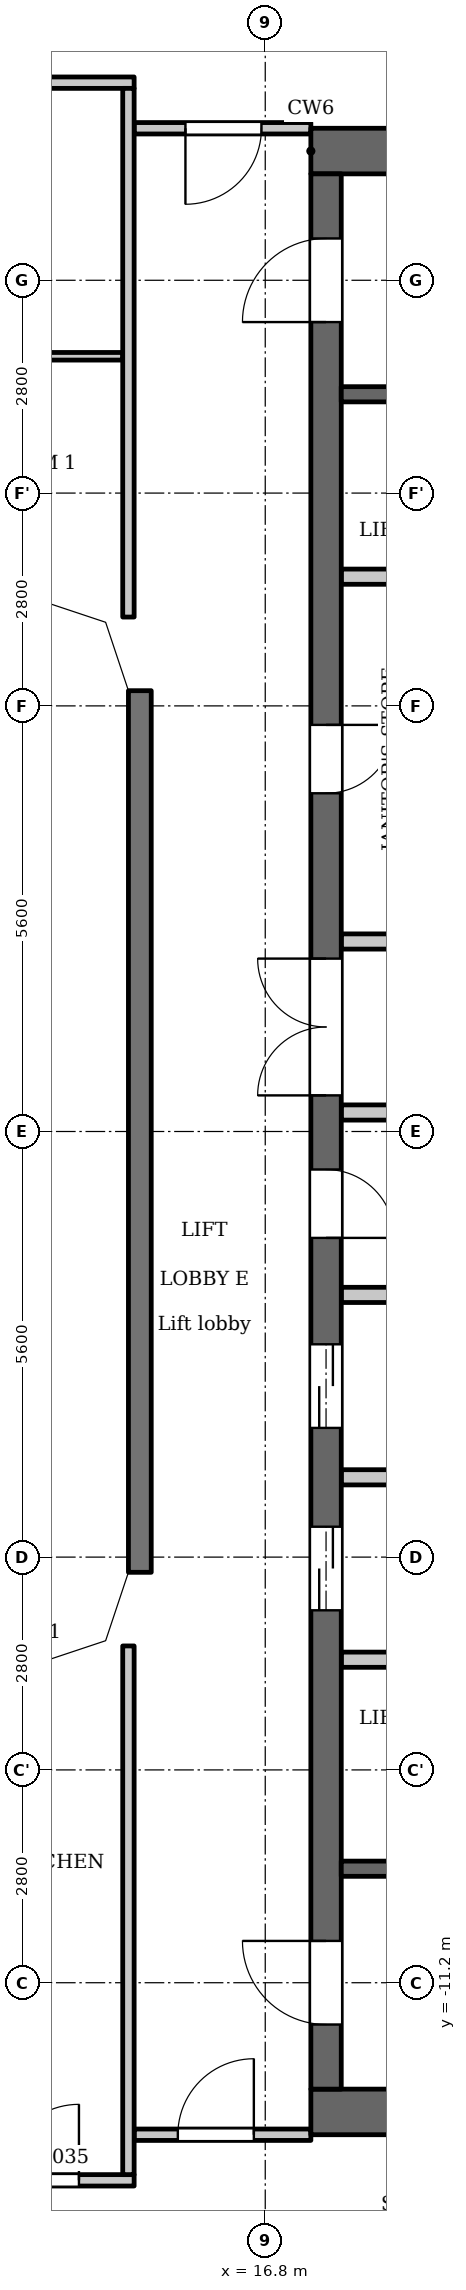
"""IFC4 building model, lengths in metres.
Left out: names, types, materials, properties, quantities, classifications, styles, units other than length and angle.
Written with IfcOpenShell. Run it as: python <this file> out.ifc"""

import sys

from ifc_helpers import new_model, si_unit, direction, frame, frame_2d, origin, place, context, subcontext, project, spatial, polyline, rectangle, outline, extrude, element, fill, save


model = new_model("IFC4")
c1 = context("Model", 3, precision=1e-05, world=origin(), true_north=direction((0.0, 1.0)))
c2 = subcontext(c1, "Body", "Model", "MODEL_VIEW")
j1 = project(units=[si_unit("LENGTHUNIT", "METRE"), si_unit("PLANEANGLEUNIT", "RADIAN")], contexts=[c1])
p1 = place(None, origin())
s1 = spatial("IfcSite", under=j1, at=p1, CompositionType="ELEMENT")
p2 = place(p1, origin())
s2 = spatial("IfcBuilding", under=s1, at=p2, CompositionType="ELEMENT")
p3 = place(p2, frame((0.0, 0.0, 276.7)))
s3 = spatial("IfcBuildingStorey", under=s2, at=p3, CompositionType="ELEMENT", Elevation=276.7)
p4 = place(p3, frame((15.15, 5.8, 0.0), z_axis=(0.0, 0.0, 1.0), x_axis=(0.0, -1.0, 0.0)))
e1 = element("IfcWall", 1, at=p4, inside=s3, PredefinedType="SOLIDWALL", context=c2, shape_type="SweptSolid", body=[
    extrude(rectangle(XDim=11.6, YDim=0.3, at=frame_2d((5.8, 0.0))), origin(), (0.0, 0.0, 1.0), 3.2),
])
for number, where, z_axis, x_axis in (
    (2, (17.4, 12.9, 0.0), (0.0, 0.0, 1.0), (1.0, 0.0, 0.0)),
    (3, (17.4, -12.9, 0.0), (0.0, 0.0, 1.0), (1.0, 0.0, 0.0)),
):
    element("IfcWall", number, at=place(p3, frame(where, z_axis=z_axis, x_axis=x_axis)), inside=s3, PredefinedType="SHEAR", context=c2, shape_type="SweptSolid", body=[
        extrude(rectangle(XDim=7.32, YDim=0.6, at=frame_2d((3.66, 0.0))), origin(), (0.0, 0.0, 1.0), 3.2),
    ])
p5 = place(p3, frame((17.6, -12.6, 0.0), z_axis=(0.0, 0.0, 1.0), x_axis=(0.0, 1.0, 0.0)))
e4 = element("IfcWall", 4, at=p5, inside=s3, PredefinedType="SHEAR", context=c2, shape_type="SweptSolid", body=[
    extrude(rectangle(XDim=25.2, YDim=0.4, at=frame_2d((12.6, 0.0))), origin(), (0.0, 0.0, 1.0), 3.2),
])
p6 = place(p5, frame((6.3, 0.0, 0.0)))
e5 = element("IfcOpeningElement", 5, at=p6, cuts=e4, PredefinedType="OPENING", context=c2, shape_type="SweptSolid", body=[
    extrude(rectangle(XDim=1.1, YDim=2.1, at=frame_2d((0.55, 1.05))), frame((0.0, 0.21, 0.0), z_axis=(0.0, -1.0, 0.0), x_axis=(1.0, 0.0, 0.0)), (0.0, 0.0, 1.0), 0.42),
])
p7 = place(p5, frame((8.7, 0.0, 0.0)))
e6 = element("IfcOpeningElement", 6, at=p7, cuts=e4, PredefinedType="OPENING", context=c2, shape_type="SweptSolid", body=[
    extrude(rectangle(XDim=1.1, YDim=2.1, at=frame_2d((0.55, 1.05))), frame((0.0, 0.21, 0.0), z_axis=(0.0, -1.0, 0.0), x_axis=(1.0, 0.0, 0.0)), (0.0, 0.0, 1.0), 0.42),
])
p8 = place(p5, frame((11.2, 0.0, 0.0)))
e7 = element("IfcOpeningElement", 7, at=p8, cuts=e4, PredefinedType="OPENING", context=c2, shape_type="SweptSolid", body=[
    extrude(rectangle(XDim=0.9, YDim=2.1, at=frame_2d((0.45, 1.05))), frame((0.0, 0.21, 0.0), z_axis=(0.0, -1.0, 0.0), x_axis=(1.0, 0.0, 0.0)), (0.0, 0.0, 1.0), 0.42),
])
p9 = place(p5, frame((17.05, 0.0, 0.0)))
e8 = element("IfcOpeningElement", 8, at=p9, cuts=e4, PredefinedType="OPENING", context=c2, shape_type="SweptSolid", body=[
    extrude(rectangle(XDim=0.9, YDim=2.1, at=frame_2d((0.45, 1.05))), frame((0.0, 0.21, 0.0), z_axis=(0.0, -1.0, 0.0), x_axis=(1.0, 0.0, 0.0)), (0.0, 0.0, 1.0), 0.42),
])
p10 = place(p5, frame((23.25, 0.0, 0.0)))
e9 = element("IfcOpeningElement", 9, at=p10, cuts=e4, PredefinedType="OPENING", context=c2, shape_type="SweptSolid", body=[
    extrude(rectangle(XDim=1.1, YDim=2.1, at=frame_2d((0.55, 1.05))), frame((0.0, 0.21, 0.0), z_axis=(0.0, -1.0, 0.0), x_axis=(1.0, 0.0, 0.0)), (0.0, 0.0, 1.0), 0.42),
])
p11 = place(p5, frame((0.85, 0.0, 0.0)))
e10 = element("IfcOpeningElement", 10, at=p11, cuts=e4, PredefinedType="OPENING", context=c2, shape_type="SweptSolid", body=[
    extrude(rectangle(XDim=1.1, YDim=2.1, at=frame_2d((0.55, 1.05))), frame((0.0, 0.21, 0.0), z_axis=(0.0, -1.0, 0.0), x_axis=(1.0, 0.0, 0.0)), (0.0, 0.0, 1.0), 0.42),
])
p12 = place(p5, frame((13.075, 0.0, 0.0)))
e11 = element("IfcOpeningElement", 11, at=p12, cuts=e4, PredefinedType="OPENING", context=c2, shape_type="SweptSolid", body=[
    extrude(rectangle(XDim=1.8, YDim=2.1, at=frame_2d((0.9, 1.05))), frame((0.0, 0.21, 0.0), z_axis=(0.0, -1.0, 0.0), x_axis=(1.0, 0.0, 0.0)), (0.0, 0.0, 1.0), 0.42),
])
p13 = place(p3, frame((17.8, -9.7, 0.0), z_axis=(0.0, 0.0, 1.0), x_axis=(1.0, 0.0, 0.0)))
e12 = element("IfcWall", 12, at=p13, inside=s3, PredefinedType="SHEAR", context=c2, shape_type="SweptSolid", body=[
    extrude(rectangle(XDim=5.8, YDim=0.2, at=frame_2d((2.9, 0.0))), origin(), (0.0, 0.0, 1.0), 3.2),
])
p14 = place(p13, frame((0.85, 0.0, 0.0)))
e13 = element("IfcOpeningElement", 13, at=p14, cuts=e12, PredefinedType="OPENING", context=c2, shape_type="SweptSolid", body=[
    extrude(rectangle(XDim=1.1, YDim=2.1, at=frame_2d((0.55, 1.05))), frame((0.0, 0.11, 0.0), z_axis=(0.0, -1.0, 0.0), x_axis=(1.0, 0.0, 0.0)), (0.0, 0.0, 1.0), 0.22),
])
p15 = place(p13, frame((3.75, 0.0, 0.0)))
e14 = element("IfcOpeningElement", 14, at=p15, cuts=e12, PredefinedType="OPENING", context=c2, shape_type="SweptSolid", body=[
    extrude(rectangle(XDim=1.1, YDim=2.1, at=frame_2d((0.55, 1.05))), frame((0.0, 0.11, 0.0), z_axis=(0.0, -1.0, 0.0), x_axis=(1.0, 0.0, 0.0)), (0.0, 0.0, 1.0), 0.22),
])
for number, where, z_axis, x_axis in (
    (15, (17.8, -6.95, 0.0), (0.0, 0.0, 1.0), (1.0, 0.0, 0.0)),
    (16, (17.8, -4.55, 0.0), (0.0, 0.0, 1.0), (1.0, 0.0, 0.0)),
    (17, (17.8, -2.15, 0.0), (0.0, 0.0, 1.0), (1.0, 0.0, 0.0)),
):
    element("IfcWall", number, at=place(p3, frame(where, z_axis=z_axis, x_axis=x_axis)), inside=s3, PredefinedType="PARTITIONING", context=c2, shape_type="SweptSolid", body=[
        extrude(rectangle(XDim=2.8, YDim=0.2, at=frame_2d((1.4, 0.0))), origin(), (0.0, 0.0, 1.0), 3.2),
    ])
p16 = place(p3, frame((17.8, 0.25, 0.0), z_axis=(0.0, 0.0, 1.0), x_axis=(1.0, 0.0, 0.0)))
e18 = element("IfcWall", 18, at=p16, inside=s3, PredefinedType="PARTITIONING", context=c2, shape_type="SweptSolid", body=[
    extrude(rectangle(XDim=3.0, YDim=0.2, at=frame_2d((1.5, 0.0))), origin(), (0.0, 0.0, 1.0), 3.2),
])
p17 = place(p3, frame((17.8, 2.5, 0.0), z_axis=(0.0, 0.0, 1.0), x_axis=(1.0, 0.0, 0.0)))
e19 = element("IfcWall", 19, at=p17, inside=s3, PredefinedType="PARTITIONING", context=c2, shape_type="SweptSolid", body=[
    extrude(rectangle(XDim=3.0, YDim=0.2, at=frame_2d((1.5, 0.0))), origin(), (0.0, 0.0, 1.0), 3.2),
])
p18 = place(p17, frame((1.7, 0.0, 0.0)))
e20 = element("IfcOpeningElement", 20, at=p18, cuts=e19, PredefinedType="OPENING", context=c2, shape_type="SweptSolid", body=[
    extrude(rectangle(XDim=0.9, YDim=2.1, at=frame_2d((0.45, 1.05))), frame((0.0, 0.11, 0.0), z_axis=(0.0, -1.0, 0.0), x_axis=(1.0, 0.0, 0.0)), (0.0, 0.0, 1.0), 0.22),
])
p19 = place(p3, frame((17.8, 7.3, 0.0), z_axis=(0.0, 0.0, 1.0), x_axis=(1.0, 0.0, 0.0)))
e21 = element("IfcWall", 21, at=p19, inside=s3, PredefinedType="PARTITIONING", context=c2, shape_type="SweptSolid", body=[
    extrude(rectangle(XDim=2.8, YDim=0.2, at=frame_2d((1.4, 0.0))), origin(), (0.0, 0.0, 1.0), 3.2),
])
p20 = place(p3, frame((17.8, 9.7, 0.0), z_axis=(0.0, 0.0, 1.0), x_axis=(1.0, 0.0, 0.0)))
e22 = element("IfcWall", 22, at=p20, inside=s3, PredefinedType="SHEAR", context=c2, shape_type="SweptSolid", body=[
    extrude(rectangle(XDim=5.8, YDim=0.2, at=frame_2d((2.9, 0.0))), origin(), (0.0, 0.0, 1.0), 3.2),
])
p21 = place(p20, frame((0.85, 0.0, 0.0)))
e23 = element("IfcOpeningElement", 23, at=p21, cuts=e22, PredefinedType="OPENING", context=c2, shape_type="SweptSolid", body=[
    extrude(rectangle(XDim=1.1, YDim=2.1, at=frame_2d((0.55, 1.05))), frame((0.0, 0.11, 0.0), z_axis=(0.0, -1.0, 0.0), x_axis=(1.0, 0.0, 0.0)), (0.0, 0.0, 1.0), 0.22),
])
p22 = place(p20, frame((3.75, 0.0, 0.0)))
e24 = element("IfcOpeningElement", 24, at=p22, cuts=e22, PredefinedType="OPENING", context=c2, shape_type="SweptSolid", body=[
    extrude(rectangle(XDim=1.1, YDim=2.1, at=frame_2d((0.55, 1.05))), frame((0.0, 0.11, 0.0), z_axis=(0.0, -1.0, 0.0), x_axis=(1.0, 0.0, 0.0)), (0.0, 0.0, 1.0), 0.22),
])
p23 = place(p3, frame((-15.075, -13.8, 0.0), z_axis=(0.0, 0.0, 1.0), x_axis=(1.0, 0.0, 0.0)))
e25 = element("IfcWall", 25, at=p23, inside=s3, PredefinedType="PARTITIONING", context=c2, shape_type="SweptSolid", body=[
    extrude(rectangle(XDim=30.15, YDim=0.15, at=frame_2d((15.075, 0.0))), origin(), (0.0, 0.0, 1.0), 3.2),
])
p24 = place(p23, frame((0.725, 0.0, 0.0)))
e26 = element("IfcOpeningElement", 26, at=p24, cuts=e25, PredefinedType="OPENING", context=c2, shape_type="SweptSolid", body=[
    extrude(rectangle(XDim=1.0, YDim=2.1, at=frame_2d((0.5, 1.05))), frame((0.0, 0.085, 0.0), z_axis=(0.0, -1.0, 0.0), x_axis=(1.0, 0.0, 0.0)), (0.0, 0.0, 1.0), 0.17),
])
p25 = place(p23, frame((7.825, 0.0, 0.0)))
e27 = element("IfcOpeningElement", 27, at=p25, cuts=e25, PredefinedType="OPENING", context=c2, shape_type="SweptSolid", body=[
    extrude(rectangle(XDim=1.0, YDim=2.1, at=frame_2d((0.5, 1.05))), frame((0.0, 0.085, 0.0), z_axis=(0.0, -1.0, 0.0), x_axis=(1.0, 0.0, 0.0)), (0.0, 0.0, 1.0), 0.17),
])
p26 = place(p23, frame((10.175, 0.0, 0.0)))
e28 = element("IfcOpeningElement", 28, at=p26, cuts=e25, PredefinedType="OPENING", context=c2, shape_type="SweptSolid", body=[
    extrude(rectangle(XDim=1.0, YDim=2.1, at=frame_2d((0.5, 1.05))), frame((0.0, 0.085, 0.0), z_axis=(0.0, -1.0, 0.0), x_axis=(1.0, 0.0, 0.0)), (0.0, 0.0, 1.0), 0.17),
])
p27 = place(p23, frame((19.025, 0.0, 0.0)))
e29 = element("IfcOpeningElement", 29, at=p27, cuts=e25, PredefinedType="OPENING", context=c2, shape_type="SweptSolid", body=[
    extrude(rectangle(XDim=1.0, YDim=2.1, at=frame_2d((0.5, 1.05))), frame((0.0, 0.085, 0.0), z_axis=(0.0, -1.0, 0.0), x_axis=(1.0, 0.0, 0.0)), (0.0, 0.0, 1.0), 0.17),
])
p28 = place(p23, frame((21.375, 0.0, 0.0)))
e30 = element("IfcOpeningElement", 30, at=p28, cuts=e25, PredefinedType="OPENING", context=c2, shape_type="SweptSolid", body=[
    extrude(rectangle(XDim=1.0, YDim=2.1, at=frame_2d((0.5, 1.05))), frame((0.0, 0.085, 0.0), z_axis=(0.0, -1.0, 0.0), x_axis=(1.0, 0.0, 0.0)), (0.0, 0.0, 1.0), 0.17),
])
p29 = place(p23, frame((28.424, 0.0, 0.0)))
e31 = element("IfcOpeningElement", 31, at=p29, cuts=e25, PredefinedType="OPENING", context=c2, shape_type="SweptSolid", body=[
    extrude(rectangle(XDim=1.0, YDim=2.1, at=frame_2d((0.5, 1.05))), frame((0.0, 0.085, 0.0), z_axis=(0.0, -1.0, 0.0), x_axis=(1.0, 0.0, 0.0)), (0.0, 0.0, 1.0), 0.17),
])
p30 = place(p3, frame((15.075, -13.2, 0.0), z_axis=(0.0, 0.0, 1.0), x_axis=(1.0, 0.0, 0.0)))
e32 = element("IfcWall", 32, at=p30, inside=s3, PredefinedType="PARTITIONING", context=c2, shape_type="SweptSolid", body=[
    extrude(rectangle(XDim=2.325, YDim=0.15, at=frame_2d((1.163, 0.0))), origin(), (0.0, 0.0, 1.0), 3.2),
])
p31 = place(p30, frame((0.575, 0.0, 0.0)))
e33 = element("IfcOpeningElement", 33, at=p31, cuts=e32, PredefinedType="OPENING", context=c2, shape_type="SweptSolid", body=[
    extrude(rectangle(XDim=1.0, YDim=2.1, at=frame_2d((0.5, 1.05))), frame((0.0, 0.085, 0.0), z_axis=(0.0, -1.0, 0.0), x_axis=(1.0, 0.0, 0.0)), (0.0, 0.0, 1.0), 0.17),
])
p32 = place(p3, frame((-14.925, 10.2, 0.0), z_axis=(0.0, 0.0, 1.0), x_axis=(1.0, 0.0, 0.0)))
e34 = element("IfcWall", 34, at=p32, inside=s3, PredefinedType="PARTITIONING", context=c2, shape_type="SweptSolid", body=[
    extrude(rectangle(XDim=29.85, YDim=0.1, at=frame_2d((14.925, 0.0))), origin(), (0.0, 0.0, 1.0), 3.2),
])
p33 = place(p32, frame((4.375, 0.0, 0.0)))
e35 = element("IfcOpeningElement", 35, at=p33, cuts=e34, PredefinedType="OPENING", context=c2, shape_type="SweptSolid", body=[
    extrude(rectangle(XDim=0.8, YDim=2.1, at=frame_2d((0.4, 1.05))), frame((0.0, 0.06, 0.0), z_axis=(0.0, -1.0, 0.0), x_axis=(1.0, 0.0, 0.0)), (0.0, 0.0, 1.0), 0.12),
])
p34 = place(p32, frame((0.576, 0.0, 0.0)))
e36 = element("IfcOpeningElement", 36, at=p34, cuts=e34, PredefinedType="OPENING", context=c2, shape_type="SweptSolid", body=[
    extrude(rectangle(XDim=0.9, YDim=2.1, at=frame_2d((0.45, 1.05))), frame((0.0, 0.06, 0.0), z_axis=(0.0, -1.0, 0.0), x_axis=(1.0, 0.0, 0.0)), (0.0, 0.0, 1.0), 0.12),
])
p35 = place(p32, frame((10.875, 0.0, 0.0)))
e37 = element("IfcOpeningElement", 37, at=p35, cuts=e34, PredefinedType="OPENING", context=c2, shape_type="SweptSolid", body=[
    extrude(rectangle(XDim=0.8, YDim=2.1, at=frame_2d((0.4, 1.05))), frame((0.0, 0.06, 0.0), z_axis=(0.0, -1.0, 0.0), x_axis=(1.0, 0.0, 0.0)), (0.0, 0.0, 1.0), 0.12),
])
p36 = place(p32, frame((12.725, 0.0, 0.0)))
e38 = element("IfcOpeningElement", 38, at=p36, cuts=e34, PredefinedType="OPENING", context=c2, shape_type="SweptSolid", body=[
    extrude(rectangle(XDim=0.9, YDim=2.1, at=frame_2d((0.45, 1.05))), frame((0.0, 0.06, 0.0), z_axis=(0.0, -1.0, 0.0), x_axis=(1.0, 0.0, 0.0)), (0.0, 0.0, 1.0), 0.12),
])
p37 = place(p32, frame((16.075, 0.0, 0.0)))
e39 = element("IfcOpeningElement", 39, at=p37, cuts=e34, PredefinedType="OPENING", context=c2, shape_type="SweptSolid", body=[
    extrude(rectangle(XDim=0.9, YDim=2.1, at=frame_2d((0.45, 1.05))), frame((0.0, 0.06, 0.0), z_axis=(0.0, -1.0, 0.0), x_axis=(1.0, 0.0, 0.0)), (0.0, 0.0, 1.0), 0.12),
])
p38 = place(p32, frame((18.925, 0.0, 0.0)))
e40 = element("IfcOpeningElement", 40, at=p38, cuts=e34, PredefinedType="OPENING", context=c2, shape_type="SweptSolid", body=[
    extrude(rectangle(XDim=0.9, YDim=2.1, at=frame_2d((0.45, 1.05))), frame((0.0, 0.06, 0.0), z_axis=(0.0, -1.0, 0.0), x_axis=(1.0, 0.0, 0.0)), (0.0, 0.0, 1.0), 0.12),
])
p39 = place(p32, frame((26.724, 0.0, 0.0)))
e41 = element("IfcOpeningElement", 41, at=p39, cuts=e34, PredefinedType="OPENING", context=c2, shape_type="SweptSolid", body=[
    extrude(rectangle(XDim=0.8, YDim=2.1, at=frame_2d((0.4, 1.05))), frame((0.0, 0.06, 0.0), z_axis=(0.0, -1.0, 0.0), x_axis=(1.0, 0.0, 0.0)), (0.0, 0.0, 1.0), 0.12),
])
p40 = place(p32, frame((21.175, 0.0, 0.0)))
e42 = element("IfcOpeningElement", 42, at=p40, cuts=e34, PredefinedType="OPENING", context=c2, shape_type="SweptSolid", body=[
    extrude(rectangle(XDim=0.9, YDim=2.1, at=frame_2d((0.45, 1.05))), frame((0.0, 0.06, 0.0), z_axis=(0.0, -1.0, 0.0), x_axis=(1.0, 0.0, 0.0)), (0.0, 0.0, 1.0), 0.12),
])
p41 = place(p3, frame((15.075, 13.2, 0.0), z_axis=(0.0, 0.0, 1.0), x_axis=(1.0, 0.0, 0.0)))
e43 = element("IfcWall", 43, at=p41, inside=s3, PredefinedType="PARTITIONING", context=c2, shape_type="SweptSolid", body=[
    extrude(rectangle(XDim=2.325, YDim=0.15, at=frame_2d((1.163, 0.0))), origin(), (0.0, 0.0, 1.0), 3.2),
])
p42 = place(p41, frame((0.675, 0.0, 0.0)))
e44 = element("IfcOpeningElement", 44, at=p42, cuts=e43, PredefinedType="OPENING", context=c2, shape_type="SweptSolid", body=[
    extrude(rectangle(XDim=1.0, YDim=2.1, at=frame_2d((0.5, 1.05))), frame((0.0, 0.085, 0.0), z_axis=(0.0, -1.0, 0.0), x_axis=(1.0, 0.0, 0.0)), (0.0, 0.0, 1.0), 0.17),
])
p43 = place(p3, frame((-15.075, 13.8, 0.0), z_axis=(0.0, 0.0, 1.0), x_axis=(1.0, 0.0, 0.0)))
e45 = element("IfcWall", 45, at=p43, inside=s3, PredefinedType="PARTITIONING", context=c2, shape_type="SweptSolid", body=[
    extrude(rectangle(XDim=30.15, YDim=0.15, at=frame_2d((15.075, 0.0))), origin(), (0.0, 0.0, 1.0), 3.2),
])
p44 = place(p43, frame((0.726, 0.0, 0.0)))
e46 = element("IfcOpeningElement", 46, at=p44, cuts=e45, PredefinedType="OPENING", context=c2, shape_type="SweptSolid", body=[
    extrude(rectangle(XDim=1.0, YDim=2.1, at=frame_2d((0.5, 1.05))), frame((0.0, 0.085, 0.0), z_axis=(0.0, -1.0, 0.0), x_axis=(1.0, 0.0, 0.0)), (0.0, 0.0, 1.0), 0.17),
])
p45 = place(p43, frame((15.725, 0.0, 0.0)))
e47 = element("IfcOpeningElement", 47, at=p45, cuts=e45, PredefinedType="OPENING", context=c2, shape_type="SweptSolid", body=[
    extrude(rectangle(XDim=1.0, YDim=2.1, at=frame_2d((0.5, 1.05))), frame((0.0, 0.085, 0.0), z_axis=(0.0, -1.0, 0.0), x_axis=(1.0, 0.0, 0.0)), (0.0, 0.0, 1.0), 0.17),
])
p46 = place(p43, frame((21.325, 0.0, 0.0)))
e48 = element("IfcOpeningElement", 48, at=p46, cuts=e45, PredefinedType="OPENING", context=c2, shape_type="SweptSolid", body=[
    extrude(rectangle(XDim=1.0, YDim=2.1, at=frame_2d((0.5, 1.05))), frame((0.0, 0.085, 0.0), z_axis=(0.0, -1.0, 0.0), x_axis=(1.0, 0.0, 0.0)), (0.0, 0.0, 1.0), 0.17),
])
for number, where, z_axis, x_axis in (
    (49, (15.0, -13.725, 0.0), (0.0, 0.0, 1.0), (0.0, 1.0, 0.0)),
    (50, (15.0, 6.769, 0.0), (0.0, 0.0, 1.0), (0.0, 1.0, 0.0)),
):
    element("IfcWall", number, at=place(p3, frame(where, z_axis=z_axis, x_axis=x_axis)), inside=s3, PredefinedType="PARTITIONING", context=c2, shape_type="SweptSolid", body=[
        extrude(rectangle(XDim=6.956, YDim=0.15, at=frame_2d((3.478, 0.0))), origin(), (0.0, 0.0, 1.0), 3.2),
    ])
p47 = place(p3, origin())
e51 = element("IfcWall", 51, at=p47, inside=s3, PredefinedType="SOLIDWALL", context=c2, shape_type="SweptSolid", body=[
    extrude(outline(polyline([(14.937, 6.937), (13.849, 7.3), (13.8, 7.3), (13.8, 7.0), (14.7, 6.7), (15.0, 5.8), (15.3, 5.8), (15.3, 5.849), (14.937, 6.937)])), origin(), (0.0, 0.0, 1.0), 3.2),
])
e52 = element("IfcWall", 52, at=p47, inside=s3, PredefinedType="SOLIDWALL", context=c2, shape_type="SweptSolid", body=[
    extrude(outline(polyline([(14.937, -6.937), (15.3, -5.849), (15.3, -5.8), (15.0, -5.8), (14.7, -6.7), (13.8, -7.0), (13.8, -7.3), (13.849, -7.3), (14.937, -6.937)])), origin(), (0.0, 0.0, 1.0), 3.2),
])
p48 = place(p6, origin())
e53 = element("IfcDoor", 53, at=p48, inside=s3, OperationType="DOUBLE_DOOR_SLIDING", PredefinedType="DOOR", context=c2, shape_type="SweptSolid", body=[
    extrude(rectangle(XDim=1.1, YDim=2.1, at=frame_2d((0.55, 1.05))), frame((0.0, 0.025, 0.0), z_axis=(0.0, -1.0, 0.0), x_axis=(1.0, 0.0, 0.0)), (0.0, 0.0, 1.0), 0.05),
])
fill(e5, e53)
p49 = place(p7, origin())
e54 = element("IfcDoor", 54, at=p49, inside=s3, OperationType="DOUBLE_DOOR_SLIDING", PredefinedType="DOOR", context=c2, shape_type="SweptSolid", body=[
    extrude(rectangle(XDim=1.1, YDim=2.1, at=frame_2d((0.55, 1.05))), frame((0.0, 0.025, 0.0), z_axis=(0.0, -1.0, 0.0), x_axis=(1.0, 0.0, 0.0)), (0.0, 0.0, 1.0), 0.05),
])
fill(e6, e54)
p50 = place(p8, origin())
e55 = element("IfcDoor", 55, at=p50, inside=s3, OperationType="SINGLE_SWING_LEFT", PredefinedType="DOOR", context=c2, shape_type="SweptSolid", body=[
    extrude(rectangle(XDim=0.9, YDim=2.1, at=frame_2d((0.45, 1.05))), frame((0.0, 0.025, 0.0), z_axis=(0.0, -1.0, 0.0), x_axis=(1.0, 0.0, 0.0)), (0.0, 0.0, 1.0), 0.05),
])
fill(e7, e55)
p51 = place(p9, origin())
e56 = element("IfcDoor", 56, at=p51, inside=s3, OperationType="SINGLE_SWING_RIGHT", PredefinedType="DOOR", context=c2, shape_type="SweptSolid", body=[
    extrude(rectangle(XDim=0.9, YDim=2.1, at=frame_2d((0.45, 1.05))), frame((0.0, 0.025, 0.0), z_axis=(0.0, -1.0, 0.0), x_axis=(1.0, 0.0, 0.0)), (0.0, 0.0, 1.0), 0.05),
])
fill(e8, e56)
p52 = place(p10, origin())
e57 = element("IfcDoor", 57, at=p52, inside=s3, OperationType="SINGLE_SWING_RIGHT", PredefinedType="DOOR", context=c2, shape_type="SweptSolid", body=[
    extrude(rectangle(XDim=1.1, YDim=2.1, at=frame_2d((0.55, 1.05))), frame((0.0, 0.025, 0.0), z_axis=(0.0, -1.0, 0.0), x_axis=(1.0, 0.0, 0.0)), (0.0, 0.0, 1.0), 0.05),
])
fill(e9, e57)
p53 = place(p11, origin())
e58 = element("IfcDoor", 58, at=p53, inside=s3, OperationType="SINGLE_SWING_LEFT", PredefinedType="DOOR", context=c2, shape_type="SweptSolid", body=[
    extrude(rectangle(XDim=1.1, YDim=2.1, at=frame_2d((0.55, 1.05))), frame((0.0, 0.025, 0.0), z_axis=(0.0, -1.0, 0.0), x_axis=(1.0, 0.0, 0.0)), (0.0, 0.0, 1.0), 0.05),
])
fill(e10, e58)
p54 = place(p12, origin())
e59 = element("IfcDoor", 59, at=p54, inside=s3, OperationType="DOUBLE_DOOR_SINGLE_SWING", PredefinedType="DOOR", context=c2, shape_type="SweptSolid", body=[
    extrude(rectangle(XDim=1.8, YDim=2.1, at=frame_2d((0.9, 1.05))), frame((0.0, 0.025, 0.0), z_axis=(0.0, -1.0, 0.0), x_axis=(1.0, 0.0, 0.0)), (0.0, 0.0, 1.0), 0.05),
])
fill(e11, e59)
p55 = place(p42, origin())
e60 = element("IfcDoor", 60, at=p55, inside=s3, OperationType="SINGLE_SWING_LEFT", PredefinedType="DOOR", context=c2, shape_type="SweptSolid", body=[
    extrude(rectangle(XDim=1.0, YDim=2.1, at=frame_2d((0.5, 1.05))), frame((0.0, 0.025, 0.0), z_axis=(0.0, -1.0, 0.0), x_axis=(1.0, 0.0, 0.0)), (0.0, 0.0, 1.0), 0.05),
])
fill(e44, e60)
p56 = place(p31, origin())
e61 = element("IfcDoor", 61, at=p56, inside=s3, OperationType="SINGLE_SWING_LEFT", PredefinedType="DOOR", context=c2, shape_type="SweptSolid", body=[
    extrude(rectangle(XDim=1.0, YDim=2.1, at=frame_2d((0.5, 1.05))), frame((0.0, 0.025, 0.0), z_axis=(0.0, -1.0, 0.0), x_axis=(1.0, 0.0, 0.0)), (0.0, 0.0, 1.0), 0.05),
])
fill(e33, e61)
p57 = place(p29, origin())
e62 = element("IfcDoor", 62, at=p57, inside=s3, OperationType="SINGLE_SWING_LEFT", PredefinedType="DOOR", context=c2, shape_type="SweptSolid", body=[
    extrude(rectangle(XDim=1.0, YDim=2.1, at=frame_2d((0.5, 1.05))), frame((0.0, 0.025, 0.0), z_axis=(0.0, -1.0, 0.0), x_axis=(1.0, 0.0, 0.0)), (0.0, 0.0, 1.0), 0.05),
])
fill(e31, e62)
save(model, sys.argv[1])
